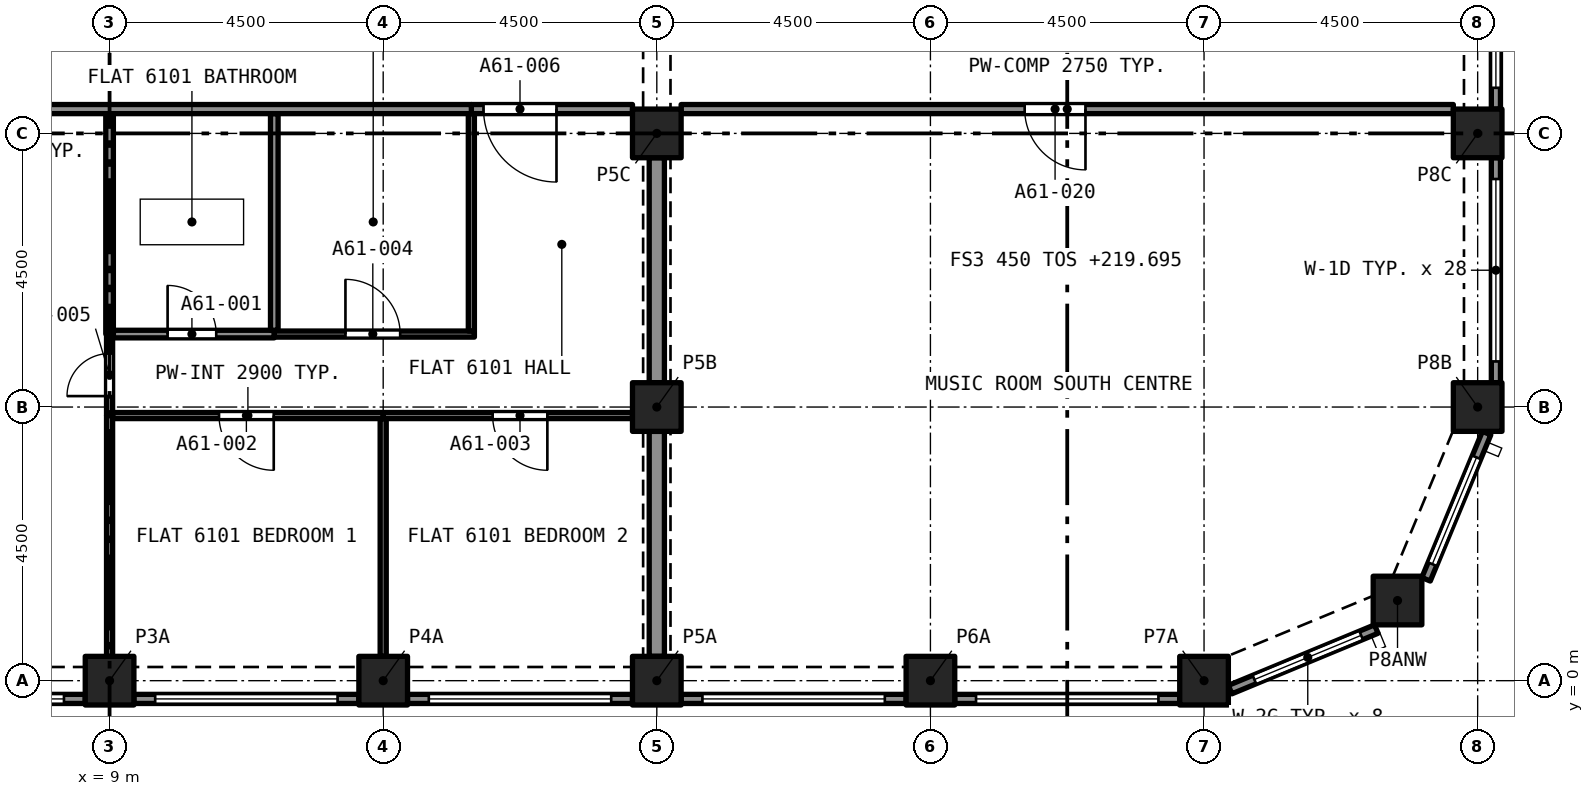
"""IFC4 building model, lengths in metres.
Left out: names, types, materials, properties, quantities, classifications, styles, units other than length and angle.
Written with IfcOpenShell. Run it as: python <this file> out.ifc"""

import sys

from ifc_helpers import new_model, si_unit, direction, frame, frame_2d, origin, origin_2d, place, context, subcontext, project, spatial, rectangle, extrude, element, fill, save


model = new_model("IFC4")
c1 = context("Model", 3, precision=1e-05, world=origin(), true_north=direction((0.0, 1.0)))
c2 = subcontext(c1, "Body", "Model", "MODEL_VIEW")
j1 = project(units=[si_unit("LENGTHUNIT", "METRE"), si_unit("PLANEANGLEUNIT", "RADIAN")], contexts=[c1])
p1 = place(None, origin())
s1 = spatial("IfcSite", under=j1, at=p1, CompositionType="ELEMENT")
p2 = place(p1, origin())
s2 = spatial("IfcBuilding", under=s1, at=p2, CompositionType="ELEMENT")
p3 = place(p2, frame((0.0, 0.0, 219.695)))
s3 = spatial("IfcBuildingStorey", under=s2, at=p3, CompositionType="ELEMENT", Elevation=219.695)
for number, where, z_axis, x_axis in (
    (1, (9.0, 0.0, 0.0), (0.0, 0.0, 1.0), (1.0, 0.0, 0.0)),
    (2, (13.5, 0.0, 0.0), (0.0, 0.0, 1.0), (1.0, 0.0, 0.0)),
    (3, (18.0, 0.0, 0.0), (0.0, 0.0, 1.0), (1.0, 0.0, 0.0)),
    (4, (22.5, 0.0, 0.0), (0.0, 0.0, 1.0), (1.0, 0.0, 0.0)),
    (5, (27.0, 0.0, 0.0), (0.0, 0.0, 1.0), (1.0, 0.0, 0.0)),
    (6, (30.182, 1.318, 0.0), (0.0, 0.0, 1.0), (1.0, 0.0, 0.0)),
    (7, (18.0, 4.5, 0.0), (0.0, 0.0, 1.0), (1.0, 0.0, 0.0)),
    (8, (31.5, 4.5, 0.0), (0.0, 0.0, 1.0), (1.0, 0.0, 0.0)),
    (9, (18.0, 9.0, 0.0), (0.0, 0.0, 1.0), (1.0, 0.0, 0.0)),
    (10, (31.5, 9.0, 0.0), (0.0, 0.0, 1.0), (1.0, 0.0, 0.0)),
):
    element("IfcColumn", number, at=place(p3, frame(where, z_axis=z_axis, x_axis=x_axis)), inside=s3, PredefinedType="COLUMN", context=c2, shape_type="SweptSolid", body=[
        extrude(rectangle(XDim=0.8, YDim=0.8, at=origin_2d()), origin(), (0.0, 0.0, 1.0), 3.2),
    ])
p4 = place(p3, frame((29.833, 0.849, 0.0), z_axis=(0.0, 0.0, 1.0), x_axis=(-0.923885342263, -0.382669406082, 0.0)))
e11 = element("IfcWall", 11, at=p4, inside=s3, PredefinedType="SOLIDWALL", context=c2, shape_type="SweptSolid", body=[
    extrude(rectangle(XDim=2.602, YDim=0.15, at=frame_2d((1.301, 0.0))), origin(), (0.0, 0.0, 1.0), 3.2),
])
p5 = place(p4, frame((0.27, 0.0, 0.45)))
e12 = element("IfcOpeningElement", 12, at=p5, cuts=e11, PredefinedType="OPENING", context=c2, shape_type="SweptSolid", body=[
    extrude(rectangle(XDim=1.9, YDim=1.95, at=frame_2d((0.95, 0.975))), frame((0.0, 0.085, 0.0), z_axis=(0.0, -1.0, 0.0), x_axis=(1.0, 0.0, 0.0)), (0.0, 0.0, 1.0), 0.17),
])
p6 = place(p3, frame((31.647, 4.071, 0.0), z_axis=(0.0, 0.0, 1.0), x_axis=(-0.382669406082, -0.923885342263, 0.0)))
e13 = element("IfcWall", 13, at=p6, inside=s3, PredefinedType="SOLIDWALL", context=c2, shape_type="SweptSolid", body=[
    extrude(rectangle(XDim=2.602, YDim=0.15, at=frame_2d((1.301, 0.0))), origin(), (0.0, 0.0, 1.0), 3.2),
])
p7 = place(p6, frame((0.432, 0.0, 0.45)))
e14 = element("IfcOpeningElement", 14, at=p7, cuts=e13, PredefinedType="OPENING", context=c2, shape_type="SweptSolid", body=[
    extrude(rectangle(XDim=1.9, YDim=1.95, at=frame_2d((0.95, 0.975))), frame((0.0, 0.085, 0.0), z_axis=(0.0, -1.0, 0.0), x_axis=(1.0, 0.0, 0.0)), (0.0, 0.0, 1.0), 0.17),
])
p8 = place(p3, frame((31.8, 8.6, 0.0), z_axis=(0.0, 0.0, 1.0), x_axis=(0.0, -1.0, 0.0)))
e15 = element("IfcWall", 15, at=p8, inside=s3, PredefinedType="SOLIDWALL", context=c2, shape_type="SweptSolid", body=[
    extrude(rectangle(XDim=3.7, YDim=0.15, at=frame_2d((1.85, 0.0))), origin(), (0.0, 0.0, 1.0), 3.2),
])
p9 = place(p8, frame((0.35, 0.0, 0.45)))
e16 = element("IfcOpeningElement", 16, at=p9, cuts=e15, PredefinedType="OPENING", context=c2, shape_type="SweptSolid", body=[
    extrude(rectangle(XDim=3.0, YDim=1.95, at=frame_2d((1.5, 0.975))), frame((0.0, 0.085, 0.0), z_axis=(0.0, -1.0, 0.0), x_axis=(1.0, 0.0, 0.0)), (0.0, 0.0, 1.0), 0.17),
])
p10 = place(p3, frame((31.8, 13.1, 0.0), z_axis=(0.0, 0.0, 1.0), x_axis=(0.0, -1.0, 0.0)))
e17 = element("IfcWall", 17, at=p10, inside=s3, PredefinedType="SOLIDWALL", context=c2, shape_type="SweptSolid", body=[
    extrude(rectangle(XDim=3.7, YDim=0.15, at=frame_2d((1.85, 0.0))), origin(), (0.0, 0.0, 1.0), 3.2),
])
p11 = place(p10, frame((0.35, 0.0, 0.45)))
e18 = element("IfcOpeningElement", 18, at=p11, cuts=e17, PredefinedType="OPENING", context=c2, shape_type="SweptSolid", body=[
    extrude(rectangle(XDim=3.0, YDim=1.95, at=frame_2d((1.5, 0.975))), frame((0.0, 0.085, 0.0), z_axis=(0.0, -1.0, 0.0), x_axis=(1.0, 0.0, 0.0)), (0.0, 0.0, 1.0), 0.17),
])
p12 = place(p3, frame((8.6, -0.3, 0.0), z_axis=(0.0, 0.0, 1.0), x_axis=(-1.0, 0.0, 0.0)))
e19 = element("IfcWall", 19, at=p12, inside=s3, PredefinedType="SOLIDWALL", context=c2, shape_type="SweptSolid", body=[
    extrude(rectangle(XDim=3.7, YDim=0.15, at=frame_2d((1.85, 0.0))), origin(), (0.0, 0.0, 1.0), 3.2),
])
p13 = place(p12, frame((0.35, 0.0, 0.45)))
e20 = element("IfcOpeningElement", 20, at=p13, cuts=e19, PredefinedType="OPENING", context=c2, shape_type="SweptSolid", body=[
    extrude(rectangle(XDim=3.0, YDim=1.95, at=frame_2d((1.5, 0.975))), frame((0.0, 0.085, 0.0), z_axis=(0.0, -1.0, 0.0), x_axis=(1.0, 0.0, 0.0)), (0.0, 0.0, 1.0), 0.17),
])
p14 = place(p3, frame((13.1, -0.3, 0.0), z_axis=(0.0, 0.0, 1.0), x_axis=(-1.0, 0.0, 0.0)))
e21 = element("IfcWall", 21, at=p14, inside=s3, PredefinedType="SOLIDWALL", context=c2, shape_type="SweptSolid", body=[
    extrude(rectangle(XDim=3.7, YDim=0.15, at=frame_2d((1.85, 0.0))), origin(), (0.0, 0.0, 1.0), 3.2),
])
p15 = place(p14, frame((0.35, 0.0, 0.45)))
e22 = element("IfcOpeningElement", 22, at=p15, cuts=e21, PredefinedType="OPENING", context=c2, shape_type="SweptSolid", body=[
    extrude(rectangle(XDim=3.0, YDim=1.95, at=frame_2d((1.5, 0.975))), frame((0.0, 0.085, 0.0), z_axis=(0.0, -1.0, 0.0), x_axis=(1.0, 0.0, 0.0)), (0.0, 0.0, 1.0), 0.17),
])
p16 = place(p3, frame((17.6, -0.3, 0.0), z_axis=(0.0, 0.0, 1.0), x_axis=(-1.0, 0.0, 0.0)))
e23 = element("IfcWall", 23, at=p16, inside=s3, PredefinedType="SOLIDWALL", context=c2, shape_type="SweptSolid", body=[
    extrude(rectangle(XDim=3.7, YDim=0.15, at=frame_2d((1.85, 0.0))), origin(), (0.0, 0.0, 1.0), 3.2),
])
p17 = place(p16, frame((0.35, 0.0, 0.45)))
e24 = element("IfcOpeningElement", 24, at=p17, cuts=e23, PredefinedType="OPENING", context=c2, shape_type="SweptSolid", body=[
    extrude(rectangle(XDim=3.0, YDim=1.95, at=frame_2d((1.5, 0.975))), frame((0.0, 0.085, 0.0), z_axis=(0.0, -1.0, 0.0), x_axis=(1.0, 0.0, 0.0)), (0.0, 0.0, 1.0), 0.17),
])
p18 = place(p3, frame((22.1, -0.3, 0.0), z_axis=(0.0, 0.0, 1.0), x_axis=(-1.0, 0.0, 0.0)))
e25 = element("IfcWall", 25, at=p18, inside=s3, PredefinedType="SOLIDWALL", context=c2, shape_type="SweptSolid", body=[
    extrude(rectangle(XDim=3.7, YDim=0.15, at=frame_2d((1.85, 0.0))), origin(), (0.0, 0.0, 1.0), 3.2),
])
p19 = place(p18, frame((0.35, 0.0, 0.45)))
e26 = element("IfcOpeningElement", 26, at=p19, cuts=e25, PredefinedType="OPENING", context=c2, shape_type="SweptSolid", body=[
    extrude(rectangle(XDim=3.0, YDim=1.95, at=frame_2d((1.5, 0.975))), frame((0.0, 0.085, 0.0), z_axis=(0.0, -1.0, 0.0), x_axis=(1.0, 0.0, 0.0)), (0.0, 0.0, 1.0), 0.17),
])
p20 = place(p3, frame((26.6, -0.3, 0.0), z_axis=(0.0, 0.0, 1.0), x_axis=(-1.0, 0.0, 0.0)))
e27 = element("IfcWall", 27, at=p20, inside=s3, PredefinedType="SOLIDWALL", context=c2, shape_type="SweptSolid", body=[
    extrude(rectangle(XDim=3.7, YDim=0.15, at=frame_2d((1.85, 0.0))), origin(), (0.0, 0.0, 1.0), 3.2),
])
p21 = place(p20, frame((0.35, 0.0, 0.45)))
e28 = element("IfcOpeningElement", 28, at=p21, cuts=e27, PredefinedType="OPENING", context=c2, shape_type="SweptSolid", body=[
    extrude(rectangle(XDim=3.0, YDim=1.95, at=frame_2d((1.5, 0.975))), frame((0.0, 0.085, 0.0), z_axis=(0.0, -1.0, 0.0), x_axis=(1.0, 0.0, 0.0)), (0.0, 0.0, 1.0), 0.17),
])
p22 = place(p3, frame((9.062, 5.7, 0.0), z_axis=(0.0, 0.0, 1.0), x_axis=(1.0, 0.0, 0.0)))
e29 = element("IfcWall", 29, at=p22, inside=s3, PredefinedType="PARTITIONING", context=c2, shape_type="SweptSolid", body=[
    extrude(rectangle(XDim=2.646, YDim=0.125, at=frame_2d((1.323, 0.0))), origin(), (0.0, 0.0, 1.0), 2.9),
])
p23 = place(p22, frame((0.892, 0.0, 0.0)))
e30 = element("IfcOpeningElement", 30, at=p23, cuts=e29, PredefinedType="OPENING", context=c2, shape_type="SweptSolid", body=[
    extrude(rectangle(XDim=0.8, YDim=2.1, at=frame_2d((0.4, 1.05))), frame((0.0, 0.073, 0.0), z_axis=(0.0, -1.0, 0.0), x_axis=(1.0, 0.0, 0.0)), (0.0, 0.0, 1.0), 0.145),
])
p24 = place(p3, frame((11.709, 5.762, 0.0), z_axis=(0.0, 0.0, 1.0), x_axis=(0.0, 1.0, 0.0)))
e31 = element("IfcWall", 31, at=p24, inside=s3, PredefinedType="PARTITIONING", context=c2, shape_type="SweptSolid", body=[
    extrude(rectangle(XDim=3.562, YDim=0.125, at=frame_2d((1.781, 0.0))), origin(), (0.0, 0.0, 1.0), 2.9),
])
p25 = place(p3, frame((9.0, 5.7, 0.0), z_axis=(0.0, 0.0, 1.0), x_axis=(0.0, 1.0, 0.0)))
e32 = element("IfcWall", 32, at=p25, inside=s3, PredefinedType="PARTITIONING", context=c2, shape_type="SweptSolid", body=[
    extrude(rectangle(XDim=3.625, YDim=0.125, at=frame_2d((1.812, 0.0))), origin(), (0.0, 0.0, 1.0), 2.9),
])
p26 = place(p3, frame((13.5, 0.4, 0.0), z_axis=(0.0, 0.0, 1.0), x_axis=(0.0, 1.0, 0.0)))
e33 = element("IfcWall", 33, at=p26, inside=s3, PredefinedType="PARTITIONING", context=c2, shape_type="SweptSolid", body=[
    extrude(rectangle(XDim=3.91, YDim=0.1, at=frame_2d((1.955, 0.0))), origin(), (0.0, 0.0, 1.0), 2.9),
])
p27 = place(p3, frame((13.5, 4.36, 0.0), z_axis=(0.0, 0.0, 1.0), x_axis=(-1.0, 0.0, 0.0)))
e34 = element("IfcWall", 34, at=p27, inside=s3, PredefinedType="PARTITIONING", context=c2, shape_type="SweptSolid", body=[
    extrude(rectangle(XDim=4.45, YDim=0.1, at=frame_2d((2.225, 0.0))), origin(), (0.0, 0.0, 1.0), 2.9),
])
p28 = place(p27, frame((1.8, 0.0, 0.0)))
e35 = element("IfcOpeningElement", 35, at=p28, cuts=e34, PredefinedType="OPENING", context=c2, shape_type="SweptSolid", body=[
    extrude(rectangle(XDim=0.9, YDim=2.1, at=frame_2d((0.45, 1.05))), frame((0.0, 0.06, 0.0), z_axis=(0.0, -1.0, 0.0), x_axis=(1.0, 0.0, 0.0)), (0.0, 0.0, 1.0), 0.12),
])
p29 = place(p3, frame((9.0, 0.4, 0.0), z_axis=(0.0, 0.0, 1.0), x_axis=(0.0, 1.0, 0.0)))
e36 = element("IfcWall", 36, at=p29, inside=s3, PredefinedType="PARTITIONING", context=c2, shape_type="SweptSolid", body=[
    extrude(rectangle(XDim=3.96, YDim=0.1, at=frame_2d((1.98, 0.0))), origin(), (0.0, 0.0, 1.0), 2.9),
])
p30 = place(p3, frame((17.6, 4.36, 0.0), z_axis=(0.0, 0.0, 1.0), x_axis=(-1.0, 0.0, 0.0)))
e37 = element("IfcWall", 37, at=p30, inside=s3, PredefinedType="PARTITIONING", context=c2, shape_type="SweptSolid", body=[
    extrude(rectangle(XDim=4.1, YDim=0.1, at=frame_2d((2.05, 0.0))), origin(), (0.0, 0.0, 1.0), 2.9),
])
p31 = place(p30, frame((1.4, 0.0, 0.0)))
e38 = element("IfcOpeningElement", 38, at=p31, cuts=e37, PredefinedType="OPENING", context=c2, shape_type="SweptSolid", body=[
    extrude(rectangle(XDim=0.9, YDim=2.1, at=frame_2d((0.45, 1.05))), frame((0.0, 0.06, 0.0), z_axis=(0.0, -1.0, 0.0), x_axis=(1.0, 0.0, 0.0)), (0.0, 0.0, 1.0), 0.12),
])
p32 = place(p3, frame((18.0, 0.4, 0.0), z_axis=(0.0, 0.0, 1.0), x_axis=(0.0, 1.0, 0.0)))
e39 = element("IfcWall", 39, at=p32, inside=s3, PredefinedType="PARTITIONING", context=c2, shape_type="SweptSolid", body=[
    extrude(rectangle(XDim=3.7, YDim=0.25, at=frame_2d((1.85, 0.0))), origin(), (0.0, 0.0, 1.0), 2.38),
])
p33 = place(p3, frame((11.708, 5.7, 0.0), z_axis=(0.0, 0.0, 1.0), x_axis=(1.0, 0.0, 0.0)))
e40 = element("IfcWall", 40, at=p33, inside=s3, PredefinedType="PARTITIONING", context=c2, shape_type="SweptSolid", body=[
    extrude(rectangle(XDim=3.292, YDim=0.1, at=frame_2d((1.646, 0.0))), origin(), (0.0, 0.0, 1.0), 2.9),
])
p34 = place(p33, frame((1.171, 0.0, 0.0)))
e41 = element("IfcOpeningElement", 41, at=p34, cuts=e40, PredefinedType="OPENING", context=c2, shape_type="SweptSolid", body=[
    extrude(rectangle(XDim=0.9, YDim=2.1, at=frame_2d((0.45, 1.05))), frame((0.0, 0.06, 0.0), z_axis=(0.0, -1.0, 0.0), x_axis=(1.0, 0.0, 0.0)), (0.0, 0.0, 1.0), 0.12),
])
p35 = place(p3, frame((14.95, 5.75, 0.0), z_axis=(0.0, 0.0, 1.0), x_axis=(0.0, 1.0, 0.0)))
e42 = element("IfcWall", 42, at=p35, inside=s3, PredefinedType="PARTITIONING", context=c2, shape_type="SweptSolid", body=[
    extrude(rectangle(XDim=3.575, YDim=0.1, at=frame_2d((1.788, 0.0))), origin(), (0.0, 0.0, 1.0), 2.9),
])
p36 = place(p3, frame((9.0, 4.36, 0.0), z_axis=(0.0, 0.0, 1.0), x_axis=(0.0, 1.0, 0.0)))
e43 = element("IfcWall", 43, at=p36, inside=s3, PredefinedType="PARTITIONING", context=c2, shape_type="SweptSolid", body=[
    extrude(rectangle(XDim=1.34, YDim=0.1, at=frame_2d((0.67, 0.0))), origin(), (0.0, 0.0, 1.0), 2.9),
])
p37 = place(p36, frame((0.32, 0.0, 0.0)))
e44 = element("IfcOpeningElement", 44, at=p37, cuts=e43, PredefinedType="OPENING", context=c2, shape_type="SweptSolid", body=[
    extrude(rectangle(XDim=0.7, YDim=2.1, at=frame_2d((0.35, 1.05))), frame((0.0, 0.06, 0.0), z_axis=(0.0, -1.0, 0.0), x_axis=(1.0, 0.0, 0.0)), (0.0, 0.0, 1.0), 0.12),
])
p38 = place(p3, frame((18.0, 4.9, 0.0), z_axis=(0.0, 0.0, 1.0), x_axis=(0.0, 1.0, 0.0)))
e45 = element("IfcWall", 45, at=p38, inside=s3, PredefinedType="PARTITIONING", context=c2, shape_type="SweptSolid", body=[
    extrude(rectangle(XDim=3.7, YDim=0.25, at=frame_2d((1.85, 0.0))), origin(), (0.0, 0.0, 1.0), 2.38),
])
p39 = place(p3, frame((17.6, 9.4, 0.0), z_axis=(0.0, 0.0, 1.0), x_axis=(-1.0, 0.0, 0.0)))
e46 = element("IfcWall", 46, at=p39, inside=s3, PredefinedType="PARTITIONING", context=c2, shape_type="SweptSolid", body=[
    extrude(rectangle(XDim=2.65, YDim=0.15, at=frame_2d((1.325, 0.0))), origin(), (0.0, 0.0, 1.0), 2.9),
])
p40 = place(p39, frame((1.25, 0.0, 0.0)))
e47 = element("IfcOpeningElement", 47, at=p40, cuts=e46, PredefinedType="OPENING", context=c2, shape_type="SweptSolid", body=[
    extrude(rectangle(XDim=1.2, YDim=2.4, at=frame_2d((0.6, 1.2))), frame((0.0, 0.085, 0.0), z_axis=(0.0, -1.0, 0.0), x_axis=(1.0, 0.0, 0.0)), (0.0, 0.0, 1.0), 0.17),
])
p41 = place(p3, frame((0.4, 9.4, 0.0), z_axis=(0.0, 0.0, 1.0), x_axis=(1.0, 0.0, 0.0)))
e48 = element("IfcWall", 48, at=p41, inside=s3, PredefinedType="PARTITIONING", context=c2, shape_type="SweptSolid", body=[
    extrude(rectangle(XDim=14.55, YDim=0.15, at=frame_2d((7.275, 0.0))), origin(), (0.0, 0.0, 1.0), 2.9),
])
p42 = place(p3, frame((31.1, 9.4, 0.0), z_axis=(0.0, 0.0, 1.0), x_axis=(-1.0, 0.0, 0.0)))
e49 = element("IfcWall", 49, at=p42, inside=s3, PredefinedType="PARTITIONING", context=c2, shape_type="SweptSolid", body=[
    extrude(rectangle(XDim=12.7, YDim=0.15, at=frame_2d((6.35, 0.0))), origin(), (0.0, 0.0, 1.0), 2.75),
])
p43 = place(p42, frame((6.05, 0.0, 0.0)))
e50 = element("IfcOpeningElement", 50, at=p43, cuts=e49, PredefinedType="OPENING", context=c2, shape_type="SweptSolid", body=[
    extrude(rectangle(XDim=1.0, YDim=2.1, at=frame_2d((0.5, 1.05))), frame((0.0, 0.085, 0.0), z_axis=(0.0, -1.0, 0.0), x_axis=(1.0, 0.0, 0.0)), (0.0, 0.0, 1.0), 0.17),
])
p44 = place(p5, origin())
e51 = element("IfcWindow", 51, at=p44, inside=s3, PartitioningType="SINGLE_PANEL", PredefinedType="WINDOW", context=c2, shape_type="SweptSolid", body=[
    extrude(rectangle(XDim=1.9, YDim=1.95, at=frame_2d((0.95, 0.975))), frame((0.0, 0.03, 0.0), z_axis=(0.0, -1.0, 0.0), x_axis=(1.0, 0.0, 0.0)), (0.0, 0.0, 1.0), 0.06),
])
fill(e12, e51)
p45 = place(p7, origin())
e52 = element("IfcWindow", 52, at=p45, inside=s3, PartitioningType="SINGLE_PANEL", PredefinedType="WINDOW", context=c2, shape_type="SweptSolid", body=[
    extrude(rectangle(XDim=1.9, YDim=1.95, at=frame_2d((0.95, 0.975))), frame((0.0, 0.03, 0.0), z_axis=(0.0, -1.0, 0.0), x_axis=(1.0, 0.0, 0.0)), (0.0, 0.0, 1.0), 0.06),
])
fill(e14, e52)
p46 = place(p9, origin())
e53 = element("IfcWindow", 53, at=p46, inside=s3, PartitioningType="SINGLE_PANEL", PredefinedType="WINDOW", context=c2, shape_type="SweptSolid", body=[
    extrude(rectangle(XDim=3.0, YDim=1.95, at=frame_2d((1.5, 0.975))), frame((0.0, 0.03, 0.0), z_axis=(0.0, -1.0, 0.0), x_axis=(1.0, 0.0, 0.0)), (0.0, 0.0, 1.0), 0.06),
])
fill(e16, e53)
p47 = place(p11, origin())
e54 = element("IfcWindow", 54, at=p47, inside=s3, PartitioningType="SINGLE_PANEL", PredefinedType="WINDOW", context=c2, shape_type="SweptSolid", body=[
    extrude(rectangle(XDim=3.0, YDim=1.95, at=frame_2d((1.5, 0.975))), frame((0.0, 0.03, 0.0), z_axis=(0.0, -1.0, 0.0), x_axis=(1.0, 0.0, 0.0)), (0.0, 0.0, 1.0), 0.06),
])
fill(e18, e54)
p48 = place(p13, origin())
e55 = element("IfcWindow", 55, at=p48, inside=s3, PartitioningType="SINGLE_PANEL", PredefinedType="WINDOW", context=c2, shape_type="SweptSolid", body=[
    extrude(rectangle(XDim=3.0, YDim=1.95, at=frame_2d((1.5, 0.975))), frame((0.0, 0.03, 0.0), z_axis=(0.0, -1.0, 0.0), x_axis=(1.0, 0.0, 0.0)), (0.0, 0.0, 1.0), 0.06),
])
fill(e20, e55)
p49 = place(p15, origin())
e56 = element("IfcWindow", 56, at=p49, inside=s3, PartitioningType="SINGLE_PANEL", PredefinedType="WINDOW", context=c2, shape_type="SweptSolid", body=[
    extrude(rectangle(XDim=3.0, YDim=1.95, at=frame_2d((1.5, 0.975))), frame((0.0, 0.03, 0.0), z_axis=(0.0, -1.0, 0.0), x_axis=(1.0, 0.0, 0.0)), (0.0, 0.0, 1.0), 0.06),
])
fill(e22, e56)
p50 = place(p17, origin())
e57 = element("IfcWindow", 57, at=p50, inside=s3, PartitioningType="SINGLE_PANEL", PredefinedType="WINDOW", context=c2, shape_type="SweptSolid", body=[
    extrude(rectangle(XDim=3.0, YDim=1.95, at=frame_2d((1.5, 0.975))), frame((0.0, 0.03, 0.0), z_axis=(0.0, -1.0, 0.0), x_axis=(1.0, 0.0, 0.0)), (0.0, 0.0, 1.0), 0.06),
])
fill(e24, e57)
p51 = place(p19, origin())
e58 = element("IfcWindow", 58, at=p51, inside=s3, PartitioningType="SINGLE_PANEL", PredefinedType="WINDOW", context=c2, shape_type="SweptSolid", body=[
    extrude(rectangle(XDim=3.0, YDim=1.95, at=frame_2d((1.5, 0.975))), frame((0.0, 0.03, 0.0), z_axis=(0.0, -1.0, 0.0), x_axis=(1.0, 0.0, 0.0)), (0.0, 0.0, 1.0), 0.06),
])
fill(e26, e58)
p52 = place(p21, origin())
e59 = element("IfcWindow", 59, at=p52, inside=s3, PartitioningType="SINGLE_PANEL", PredefinedType="WINDOW", context=c2, shape_type="SweptSolid", body=[
    extrude(rectangle(XDim=3.0, YDim=1.95, at=frame_2d((1.5, 0.975))), frame((0.0, 0.03, 0.0), z_axis=(0.0, -1.0, 0.0), x_axis=(1.0, 0.0, 0.0)), (0.0, 0.0, 1.0), 0.06),
])
fill(e28, e59)
p53 = place(p23, origin())
e60 = element("IfcDoor", 60, at=p53, inside=s3, OperationType="SINGLE_SWING_LEFT", PredefinedType="DOOR", context=c2, shape_type="SweptSolid", body=[
    extrude(rectangle(XDim=0.8, YDim=2.1, at=frame_2d((0.4, 1.05))), frame((0.0, 0.025, 0.0), z_axis=(0.0, -1.0, 0.0), x_axis=(1.0, 0.0, 0.0)), (0.0, 0.0, 1.0), 0.05),
])
fill(e30, e60)
p54 = place(p28, origin())
e61 = element("IfcDoor", 61, at=p54, inside=s3, OperationType="SINGLE_SWING_RIGHT", PredefinedType="DOOR", context=c2, shape_type="SweptSolid", body=[
    extrude(rectangle(XDim=0.9, YDim=2.1, at=frame_2d((0.45, 1.05))), frame((0.0, 0.025, 0.0), z_axis=(0.0, -1.0, 0.0), x_axis=(1.0, 0.0, 0.0)), (0.0, 0.0, 1.0), 0.05),
])
fill(e35, e61)
p55 = place(p31, origin())
e62 = element("IfcDoor", 62, at=p55, inside=s3, OperationType="SINGLE_SWING_LEFT", PredefinedType="DOOR", context=c2, shape_type="SweptSolid", body=[
    extrude(rectangle(XDim=0.9, YDim=2.1, at=frame_2d((0.45, 1.05))), frame((0.0, 0.025, 0.0), z_axis=(0.0, -1.0, 0.0), x_axis=(1.0, 0.0, 0.0)), (0.0, 0.0, 1.0), 0.05),
])
fill(e38, e62)
p56 = place(p34, origin())
e63 = element("IfcDoor", 63, at=p56, inside=s3, OperationType="SINGLE_SWING_LEFT", PredefinedType="DOOR", context=c2, shape_type="SweptSolid", body=[
    extrude(rectangle(XDim=0.9, YDim=2.1, at=frame_2d((0.45, 1.05))), frame((0.0, 0.025, 0.0), z_axis=(0.0, -1.0, 0.0), x_axis=(1.0, 0.0, 0.0)), (0.0, 0.0, 1.0), 0.05),
])
fill(e41, e63)
p57 = place(p37, origin())
e64 = element("IfcDoor", 64, at=p57, inside=s3, OperationType="SINGLE_SWING_LEFT", PredefinedType="DOOR", context=c2, shape_type="SweptSolid", body=[
    extrude(rectangle(XDim=0.7, YDim=2.1, at=frame_2d((0.35, 1.05))), frame((0.0, 0.025, 0.0), z_axis=(0.0, -1.0, 0.0), x_axis=(1.0, 0.0, 0.0)), (0.0, 0.0, 1.0), 0.05),
])
fill(e44, e64)
p58 = place(p40, origin())
e65 = element("IfcDoor", 65, at=p58, inside=s3, OperationType="SINGLE_SWING_RIGHT", PredefinedType="DOOR", context=c2, shape_type="SweptSolid", body=[
    extrude(rectangle(XDim=1.2, YDim=2.4, at=frame_2d((0.6, 1.2))), frame((0.0, 0.025, 0.0), z_axis=(0.0, -1.0, 0.0), x_axis=(1.0, 0.0, 0.0)), (0.0, 0.0, 1.0), 0.05),
])
fill(e47, e65)
p59 = place(p43, origin())
e66 = element("IfcDoor", 66, at=p59, inside=s3, OperationType="SINGLE_SWING_RIGHT", PredefinedType="DOOR", context=c2, shape_type="SweptSolid", body=[
    extrude(rectangle(XDim=1.0, YDim=2.1, at=frame_2d((0.5, 1.05))), frame((0.0, 0.025, 0.0), z_axis=(0.0, -1.0, 0.0), x_axis=(1.0, 0.0, 0.0)), (0.0, 0.0, 1.0), 0.05),
])
fill(e50, e66)
save(model, sys.argv[1])
